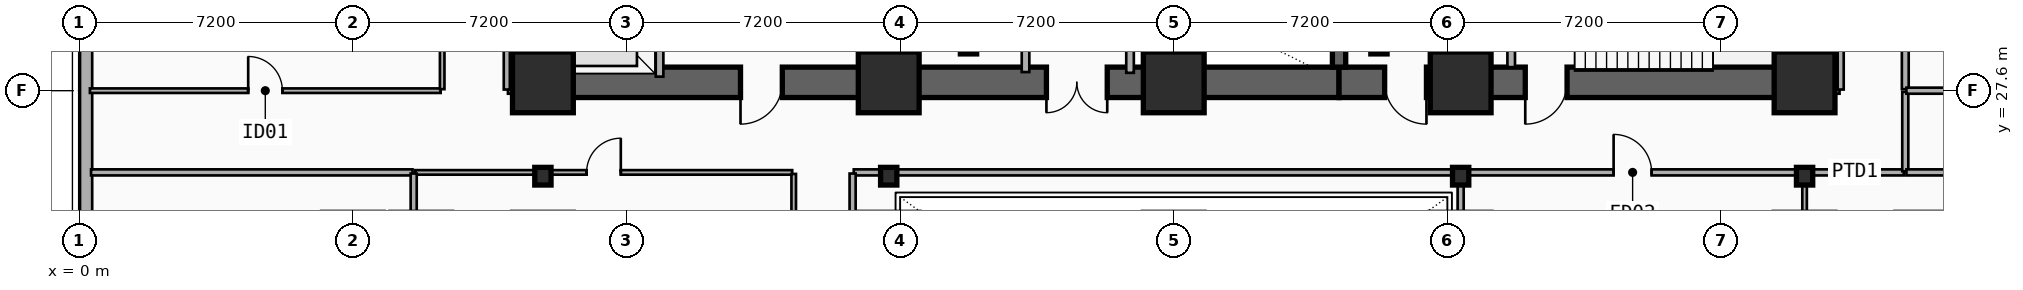
"""IFC4 building model, lengths in metres.
Left out: names, types, materials, properties, quantities, classifications, styles, units other than length and angle.
Written with IfcOpenShell. Run it as: python <this file> out.ifc"""

import sys

from ifc_helpers import new_model, si_unit, direction, frame, frame_2d, origin, origin_2d, place, context, subcontext, project, spatial, rectangle, i_section, extrude, element, fill, save


model = new_model("IFC4")
c1 = context("Model", 3, precision=1e-05, world=origin(), true_north=direction((0.0, 1.0)))
c2 = subcontext(c1, "Body", "Model", "MODEL_VIEW")
j1 = project(units=[si_unit("LENGTHUNIT", "METRE"), si_unit("PLANEANGLEUNIT", "RADIAN")], contexts=[c1])
p1 = place(None, origin())
s1 = spatial("IfcSite", under=j1, at=p1, CompositionType="ELEMENT")
p2 = place(p1, origin())
s2 = spatial("IfcBuilding", under=s1, at=p2, CompositionType="ELEMENT")
p3 = place(p2, frame((0.0, 0.0, 5.4)))
s3 = spatial("IfcBuildingStorey", under=s2, at=p3, CompositionType="ELEMENT", Elevation=5.4)
p4 = place(p3, frame((21.18, 27.82, 0.0), z_axis=(0.0, 0.0, 1.0), x_axis=(-1.0, 0.0, 0.0)))
e1 = element("IfcWall", 1, at=p4, inside=s3, PredefinedType="SHEAR", context=c2, shape_type="SweptSolid", body=[
    extrude(rectangle(XDim=9.03, YDim=0.8, at=frame_2d((4.515, 0.0))), origin(), (0.0, 0.0, 1.0), 5.0),
])
p5 = place(p4, frame((2.68, 0.0, 0.0)))
e2 = element("IfcOpeningElement", 2, at=p5, cuts=e1, PredefinedType="OPENING", context=c2, shape_type="SweptSolid", body=[
    extrude(rectangle(XDim=1.1, YDim=2.15, at=frame_2d((0.55, 1.075))), frame((0.0, 0.41, 0.0), z_axis=(0.0, -1.0, 0.0), x_axis=(1.0, 0.0, 0.0)), (0.0, 0.0, 1.0), 0.82),
])
p6 = place(p3, frame((33.15, 27.82, 0.0), z_axis=(0.0, 0.0, 1.0), x_axis=(-1.0, 0.0, 0.0)))
e3 = element("IfcWall", 3, at=p6, inside=s3, PredefinedType="SHEAR", context=c2, shape_type="SweptSolid", body=[
    extrude(rectangle(XDim=11.97, YDim=0.8, at=frame_2d((5.985, 0.0))), origin(), (0.0, 0.0, 1.0), 5.0),
])
p7 = place(p6, frame((6.1, 0.0, 0.0)))
e4 = element("IfcOpeningElement", 4, at=p7, cuts=e3, PredefinedType="OPENING", context=c2, shape_type="SweptSolid", body=[
    extrude(rectangle(XDim=1.6, YDim=2.2, at=frame_2d((0.8, 1.1))), frame((0.0, 0.41, 0.0), z_axis=(0.0, -1.0, 0.0), x_axis=(1.0, 0.0, 0.0)), (0.0, 0.0, 1.0), 0.82),
])
p8 = place(p3, frame((45.38, 27.82, 0.0), z_axis=(0.0, 0.0, 1.0), x_axis=(-1.0, 0.0, 0.0)))
e5 = element("IfcWall", 5, at=p8, inside=s3, PredefinedType="SHEAR", context=c2, shape_type="SweptSolid", body=[
    extrude(rectangle(XDim=12.23, YDim=0.8, at=frame_2d((6.115, 0.0))), origin(), (0.0, 0.0, 1.0), 5.0),
])
p9 = place(p8, frame((9.93, 0.0, 0.0)))
e6 = element("IfcOpeningElement", 6, at=p9, cuts=e5, PredefinedType="OPENING", context=c2, shape_type="SweptSolid", body=[
    extrude(rectangle(XDim=1.1, YDim=2.15, at=frame_2d((0.55, 1.075))), frame((0.0, 0.41, 0.0), z_axis=(0.0, -1.0, 0.0), x_axis=(1.0, 0.0, 0.0)), (0.0, 0.0, 1.0), 0.82),
])
p10 = place(p8, frame((6.23, 0.0, 0.0)))
e7 = element("IfcOpeningElement", 7, at=p10, cuts=e5, PredefinedType="OPENING", context=c2, shape_type="SweptSolid", body=[
    extrude(rectangle(XDim=1.1, YDim=2.15, at=frame_2d((0.55, 1.075))), frame((0.0, 0.41, 0.0), z_axis=(0.0, -1.0, 0.0), x_axis=(1.0, 0.0, 0.0)), (0.0, 0.0, 1.0), 0.82),
])
for number, where, z_axis, x_axis in (
    (8, (12.15, 28.22, 0.0), (0.0, 0.0, 1.0), (0.0, 1.0, 0.0)),
    (9, (45.38, 28.22, 0.0), (0.0, 0.0, 1.0), (0.0, 1.0, 0.0)),
):
    element("IfcWall", number, at=place(p3, frame(where, z_axis=z_axis, x_axis=x_axis)), inside=s3, PredefinedType="SHEAR", context=c2, shape_type="SweptSolid", body=[
        extrude(rectangle(XDim=8.43, YDim=0.8, at=frame_2d((4.215, 0.0))), origin(), (0.0, 0.0, 1.0), 5.0),
    ])
for number, where, z_axis, x_axis in (
    (10, (21.18, 28.22, 0.0), (0.0, 0.0, 1.0), (0.0, 1.0, 0.0)),
    (11, (33.15, 28.22, 0.0), (0.0, 0.0, 1.0), (0.0, 1.0, 0.0)),
):
    element("IfcWall", number, at=place(p3, frame(where, z_axis=z_axis, x_axis=x_axis)), inside=s3, PredefinedType="SHEAR", context=c2, shape_type="SweptSolid", body=[
        extrude(rectangle(XDim=8.43, YDim=0.35, at=frame_2d((4.215, 0.0))), origin(), (0.0, 0.0, 1.0), 5.0),
    ])
p11 = place(p3, frame((36.38, 28.22, 0.0), z_axis=(0.0, 0.0, 1.0), x_axis=(0.0, 1.0, 0.0)))
e12 = element("IfcWall", 12, at=p11, inside=s3, PredefinedType="SHEAR", context=c2, shape_type="SweptSolid", body=[
    extrude(rectangle(XDim=8.43, YDim=0.35, at=frame_2d((4.215, 0.0))), origin(), (0.0, 0.0, 1.0), 5.0),
])
p12 = place(p11, frame((3.56, 0.0, 0.0)))
e13 = element("IfcOpeningElement", 13, at=p12, cuts=e12, PredefinedType="OPENING", context=c2, shape_type="SweptSolid", body=[
    extrude(rectangle(XDim=1.1, YDim=2.15, at=frame_2d((0.55, 1.075))), frame((0.0, 0.185, 0.0), z_axis=(0.0, -1.0, 0.0), x_axis=(1.0, 0.0, 0.0)), (0.0, 0.0, 1.0), 0.37),
])
for number, where, z_axis, x_axis in (
    (14, (23.4, 28.8, 0.0), (0.0, 0.0, 1.0), (1.0, 0.0, 0.0)),
    (15, (34.2, 28.8, 0.0), (0.0, 0.0, 1.0), (1.0, 0.0, 0.0)),
):
    element("IfcColumn", number, at=place(p3, frame(where, z_axis=z_axis, x_axis=x_axis)), inside=s3, PredefinedType="COLUMN", context=c2, shape_type="SweptSolid", body=[
        extrude(i_section(OverallWidth=0.428, OverallDepth=0.465, WebThickness=0.045, FlangeThickness=0.073, FilletRadius=0.015, at=origin_2d()), origin(), (0.0, 0.0, 1.0), 5.0),
    ])
for number, where, z_axis, x_axis in (
    (16, (12.2, 27.82, 0.0), (0.0, 0.0, 1.0), (1.0, 0.0, 0.0)),
    (17, (21.3, 27.82, 0.0), (0.0, 0.0, 1.0), (1.0, 0.0, 0.0)),
    (18, (28.8, 27.82, 0.0), (0.0, 0.0, 1.0), (1.0, 0.0, 0.0)),
    (19, (36.35, 27.82, 0.0), (0.0, 0.0, 1.0), (1.0, 0.0, 0.0)),
    (20, (45.4, 27.82, 0.0), (0.0, 0.0, 1.0), (1.0, 0.0, 0.0)),
):
    element("IfcColumn", number, at=place(p3, frame(where, z_axis=z_axis, x_axis=x_axis)), inside=s3, PredefinedType="COLUMN", context=c2, shape_type="SweptSolid", body=[
        extrude(rectangle(XDim=1.6, YDim=1.6, at=origin_2d()), origin(), (0.0, 0.0, 1.0), 5.0),
    ])
for number, where, z_axis, x_axis in (
    (21, (12.2, 25.35, 0.0), (0.0, 0.0, 1.0), (1.0, 0.0, 0.0)),
    (22, (21.3, 25.35, 0.0), (0.0, 0.0, 1.0), (1.0, 0.0, 0.0)),
    (23, (36.35, 25.35, 0.0), (0.0, 0.0, 1.0), (1.0, 0.0, 0.0)),
    (24, (45.4, 25.35, 0.0), (0.0, 0.0, 1.0), (1.0, 0.0, 0.0)),
):
    element("IfcColumn", number, at=place(p3, frame(where, z_axis=z_axis, x_axis=x_axis)), inside=s3, PredefinedType="COLUMN", context=c2, shape_type="SweptSolid", body=[
        extrude(i_section(OverallWidth=0.428, OverallDepth=0.465, WebThickness=0.045, FlangeThickness=0.073, FilletRadius=0.015, at=origin_2d()), origin(), (0.0, 0.0, 1.0), 5.0),
    ])
p13 = place(p3, frame((0.18, 7.2, 0.0), z_axis=(0.0, 0.0, 1.0), x_axis=(0.0, 1.0, 0.0)))
e25 = element("IfcWall", 25, at=p13, inside=s3, PredefinedType="SOLIDWALL", context=c2, shape_type="SweptSolid", body=[
    extrude(rectangle(XDim=34.4, YDim=0.32, at=frame_2d((17.2, 0.0))), origin(), (0.0, 0.0, 1.0), 4.7),
])
p14 = place(p13, frame((22.35, 0.0, 0.9)))
e26 = element("IfcOpeningElement", 26, at=p14, cuts=e25, PredefinedType="OPENING", context=c2, shape_type="SweptSolid", body=[
    extrude(rectangle(XDim=2.4, YDim=1.8, at=frame_2d((1.2, 0.9))), frame((0.0, 0.17, 0.0), z_axis=(0.0, -1.0, 0.0), x_axis=(1.0, 0.0, 0.0)), (0.0, 0.0, 1.0), 0.34),
])
p15 = place(p13, frame((26.4, 0.0, 0.9)))
e27 = element("IfcOpeningElement", 27, at=p15, cuts=e25, PredefinedType="OPENING", context=c2, shape_type="SweptSolid", body=[
    extrude(rectangle(XDim=2.4, YDim=1.8, at=frame_2d((1.2, 0.9))), frame((0.0, 0.17, 0.0), z_axis=(0.0, -1.0, 0.0), x_axis=(1.0, 0.0, 0.0)), (0.0, 0.0, 1.0), 0.34),
])
p16 = place(p3, frame((15.27, 27.97, 0.0), z_axis=(0.0, 0.0, 1.0), x_axis=(0.0, 1.0, 0.0)))
e28 = element("IfcWall", 28, at=p16, inside=s3, PredefinedType="PARTITIONING", context=c2, shape_type="SweptSolid", body=[
    extrude(rectangle(XDim=2.96, YDim=0.2, at=frame_2d((1.48, 0.0))), origin(), (0.0, 0.0, 1.0), 3.672),
])
p17 = place(p16, frame((0.93, 0.0, 0.0)))
e29 = element("IfcOpeningElement", 29, at=p17, cuts=e28, PredefinedType="OPENING", context=c2, shape_type="SweptSolid", body=[
    extrude(rectangle(XDim=1.1, YDim=2.15, at=frame_2d((0.55, 1.075))), frame((0.0, 0.11, 0.0), z_axis=(0.0, -1.0, 0.0), x_axis=(1.0, 0.0, 0.0)), (0.0, 0.0, 1.0), 0.22),
])
p18 = place(p3, frame((27.65, 28.07, 0.0), z_axis=(0.0, 0.0, 1.0), x_axis=(0.0, 1.0, 0.0)))
e30 = element("IfcWall", 30, at=p18, inside=s3, PredefinedType="PARTITIONING", context=c2, shape_type="SweptSolid", body=[
    extrude(rectangle(XDim=2.58, YDim=0.2, at=frame_2d((1.29, 0.0))), origin(), (0.0, 0.0, 1.0), 3.672),
])
p19 = place(p3, frame((37.68, 28.22, 0.0), z_axis=(0.0, 0.0, 1.0), x_axis=(0.0, 1.0, 0.0)))
e31 = element("IfcWall", 31, at=p19, inside=s3, PredefinedType="PARTITIONING", context=c2, shape_type="SweptSolid", body=[
    extrude(rectangle(XDim=3.03, YDim=0.2, at=frame_2d((1.515, 0.0))), origin(), (0.0, 0.0, 1.0), 4.7),
])
p20 = place(p3, frame((24.9, 28.09, 0.0), z_axis=(0.0, 0.0, 1.0), x_axis=(0.0, 1.0, 0.0)))
e32 = element("IfcWall", 32, at=p20, inside=s3, PredefinedType="PARTITIONING", context=c2, shape_type="SweptSolid", body=[
    extrude(rectangle(XDim=2.82, YDim=0.2, at=frame_2d((1.41, 0.0))), origin(), (0.0, 0.0, 1.0), 4.7),
])
p21 = place(p20, frame((1.201, 0.0, 0.0)))
e33 = element("IfcOpeningElement", 33, at=p21, cuts=e32, PredefinedType="OPENING", context=c2, shape_type="SweptSolid", body=[
    extrude(rectangle(XDim=1.2, YDim=2.15, at=frame_2d((0.6, 1.075))), frame((0.0, 0.11, 0.0), z_axis=(0.0, -1.0, 0.0), x_axis=(1.0, 0.0, 0.0)), (0.0, 0.0, 1.0), 0.22),
])
p22 = place(p3, frame((0.28, 27.6, 0.0), z_axis=(0.0, 0.0, 1.0), x_axis=(1.0, 0.0, 0.0)))
e34 = element("IfcWall", 34, at=p22, inside=s3, PredefinedType="PARTITIONING", context=c2, shape_type="SweptSolid", body=[
    extrude(rectangle(XDim=9.23, YDim=0.12, at=frame_2d((4.615, 0.0))), origin(), (0.0, 0.0, 1.0), 4.7),
])
p23 = place(p22, frame((4.165, 0.0, 0.0)))
e35 = element("IfcOpeningElement", 35, at=p23, cuts=e34, PredefinedType="OPENING", context=c2, shape_type="SweptSolid", body=[
    extrude(rectangle(XDim=0.9, YDim=2.1, at=frame_2d((0.45, 1.05))), frame((0.0, 0.07, 0.0), z_axis=(0.0, -1.0, 0.0), x_axis=(1.0, 0.0, 0.0)), (0.0, 0.0, 1.0), 0.14),
])
p24 = place(p3, frame((8.84, 25.45, 0.0), z_axis=(0.0, 0.0, 1.0), x_axis=(1.0, 0.0, 0.0)))
e36 = element("IfcWall", 36, at=p24, inside=s3, PredefinedType="PARTITIONING", context=c2, shape_type="SweptSolid", body=[
    extrude(rectangle(XDim=9.92, YDim=0.12, at=frame_2d((4.96, 0.0))), origin(), (0.0, 0.0, 1.0), 3.672),
])
p25 = place(p24, frame((4.51, 0.0, 0.0)))
e37 = element("IfcOpeningElement", 37, at=p25, cuts=e36, PredefinedType="OPENING", context=c2, shape_type="SweptSolid", body=[
    extrude(rectangle(XDim=0.9, YDim=2.1, at=frame_2d((0.45, 1.05))), frame((0.0, 0.07, 0.0), z_axis=(0.0, -1.0, 0.0), x_axis=(1.0, 0.0, 0.0)), (0.0, 0.0, 1.0), 0.14),
])
p26 = place(p3, frame((36.39, 25.45, 0.0), z_axis=(0.0, 0.0, 1.0), x_axis=(1.0, 0.0, 0.0)))
e38 = element("IfcWall", 38, at=p26, inside=s3, PredefinedType="PARTITIONING", context=c2, shape_type="SweptSolid", body=[
    extrude(rectangle(XDim=8.97, YDim=0.16, at=frame_2d((4.485, 0.0))), origin(), (0.0, 0.0, 1.0), 3.672),
])
p27 = place(p26, frame((3.985, 0.0, 0.0)))
e39 = element("IfcOpeningElement", 39, at=p27, cuts=e38, PredefinedType="OPENING", context=c2, shape_type="SweptSolid", body=[
    extrude(rectangle(XDim=1.0, YDim=2.15, at=frame_2d((0.5, 1.075))), frame((0.0, 0.09, 0.0), z_axis=(0.0, -1.0, 0.0), x_axis=(1.0, 0.0, 0.0)), (0.0, 0.0, 1.0), 0.18),
])
p28 = place(p3, frame((45.44, 25.45, 0.0), z_axis=(0.0, 0.0, 1.0), x_axis=(1.0, 0.0, 0.0)))
e40 = element("IfcWall", 40, at=p28, inside=s3, PredefinedType="PARTITIONING", context=c2, shape_type="SweptSolid", body=[
    extrude(rectangle(XDim=2.57, YDim=0.16, at=frame_2d((1.285, 0.0))), origin(), (0.0, 0.0, 1.0), 3.672),
])
p29 = place(p3, frame((9.55, 27.64, 0.0), z_axis=(0.0, 0.0, 1.0), x_axis=(0.0, 1.0, 0.0)))
e41 = element("IfcWall", 41, at=p29, inside=s3, PredefinedType="PARTITIONING", context=c2, shape_type="SweptSolid", body=[
    extrude(rectangle(XDim=10.27, YDim=0.12, at=frame_2d((5.135, 0.0))), origin(), (0.0, 0.0, 1.0), 4.7),
])
p30 = place(p29, frame((4.685, 0.0, 0.0)))
e42 = element("IfcOpeningElement", 42, at=p30, cuts=e41, PredefinedType="OPENING", context=c2, shape_type="SweptSolid", body=[
    extrude(rectangle(XDim=0.9, YDim=2.1, at=frame_2d((0.45, 1.05))), frame((0.0, 0.07, 0.0), z_axis=(0.0, -1.0, 0.0), x_axis=(1.0, 0.0, 0.0)), (0.0, 0.0, 1.0), 0.14),
])
p31 = place(p3, frame((48.05, 27.64, 0.0), z_axis=(0.0, 0.0, 1.0), x_axis=(0.0, 1.0, 0.0)))
e43 = element("IfcWall", 43, at=p31, inside=s3, PredefinedType="PLUMBINGWALL", context=c2, shape_type="SweptSolid", body=[
    extrude(rectangle(XDim=3.92, YDim=0.18, at=frame_2d((1.96, 0.0))), origin(), (0.0, 0.0, 1.0), 4.7),
])
p32 = place(p31, frame((1.535, 0.0, 0.0)))
e44 = element("IfcOpeningElement", 44, at=p32, cuts=e43, PredefinedType="OPENING", context=c2, shape_type="SweptSolid", body=[
    extrude(rectangle(XDim=0.85, YDim=2.1, at=frame_2d((0.425, 1.05))), frame((0.0, 0.1, 0.0), z_axis=(0.0, -1.0, 0.0), x_axis=(1.0, 0.0, 0.0)), (0.0, 0.0, 1.0), 0.2),
])
p33 = place(p3, frame((18.8, 12.04, 0.0), z_axis=(0.0, 0.0, 1.0), x_axis=(0.0, 1.0, 0.0)))
e45 = element("IfcWall", 45, at=p33, inside=s3, PredefinedType="PARTITIONING", context=c2, shape_type="SweptSolid", body=[
    extrude(rectangle(XDim=13.37, YDim=0.12, at=frame_2d((6.685, 0.0))), origin(), (0.0, 0.0, 1.0), 3.672),
])
p34 = place(p33, frame((6.235, 0.0, 0.0)))
e46 = element("IfcOpeningElement", 46, at=p34, cuts=e45, PredefinedType="OPENING", context=c2, shape_type="SweptSolid", body=[
    extrude(rectangle(XDim=0.9, YDim=2.1, at=frame_2d((0.45, 1.05))), frame((0.0, 0.07, 0.0), z_axis=(0.0, -1.0, 0.0), x_axis=(1.0, 0.0, 0.0)), (0.0, 0.0, 1.0), 0.14),
])
p35 = place(p3, frame((45.4, 14.24, 0.0), z_axis=(0.0, 0.0, 1.0), x_axis=(0.0, 1.0, 0.0)))
e47 = element("IfcWall", 47, at=p35, inside=s3, PredefinedType="PARTITIONING", context=c2, shape_type="SweptSolid", body=[
    extrude(rectangle(XDim=11.17, YDim=0.12, at=frame_2d((5.585, 0.0))), origin(), (0.0, 0.0, 1.0), 3.672),
])
p36 = place(p35, frame((5.135, 0.0, 0.0)))
e48 = element("IfcOpeningElement", 48, at=p36, cuts=e47, PredefinedType="OPENING", context=c2, shape_type="SweptSolid", body=[
    extrude(rectangle(XDim=0.9, YDim=2.1, at=frame_2d((0.45, 1.05))), frame((0.0, 0.07, 0.0), z_axis=(0.0, -1.0, 0.0), x_axis=(1.0, 0.0, 0.0)), (0.0, 0.0, 1.0), 0.14),
])
p37 = place(p3, frame((0.31, 25.45, 0.0), z_axis=(0.0, 0.0, 1.0), x_axis=(1.0, 0.0, 0.0)))
e49 = element("IfcWall", 49, at=p37, inside=s3, PredefinedType="PARTITIONING", context=c2, shape_type="SweptSolid", body=[
    extrude(rectangle(XDim=8.46, YDim=0.16, at=frame_2d((4.23, 0.0))), origin(), (0.0, 0.0, 1.0), 4.7),
])
p38 = place(p3, frame((20.38, 25.45, 0.0), z_axis=(0.0, 0.0, 1.0), x_axis=(1.0, 0.0, 0.0)))
e50 = element("IfcWall", 50, at=p38, inside=s3, PredefinedType="PARTITIONING", context=c2, shape_type="SweptSolid", body=[
    extrude(rectangle(XDim=15.94, YDim=0.16, at=frame_2d((7.97, 0.0))), origin(), (0.0, 0.0, 1.0), 3.672),
])
p39 = place(p3, frame((11.28, 27.6, 0.0), z_axis=(0.0, 0.0, 1.0), x_axis=(1.0, 0.0, 0.0)))
e51 = element("IfcWall", 51, at=p39, inside=s3, PredefinedType="PARTITIONING", context=c2, shape_type="SweptSolid", body=[
    extrude(rectangle(XDim=0.84, YDim=0.16, at=frame_2d((0.42, 0.0))), origin(), (0.0, 0.0, 1.0), 3.672),
])
p40 = place(p3, frame((45.41, 27.6, 0.0), z_axis=(0.0, 0.0, 1.0), x_axis=(1.0, 0.0, 0.0)))
e52 = element("IfcWall", 52, at=p40, inside=s3, PredefinedType="PARTITIONING", context=c2, shape_type="SweptSolid", body=[
    extrude(rectangle(XDim=0.91, YDim=0.16, at=frame_2d((0.455, 0.0))), origin(), (0.0, 0.0, 1.0), 3.672),
])
p41 = place(p3, frame((48.05, 25.48, 0.0), z_axis=(0.0, 0.0, 1.0), x_axis=(0.0, 1.0, 0.0)))
e53 = element("IfcWall", 53, at=p41, inside=s3, PredefinedType="PARTITIONING", context=c2, shape_type="SweptSolid", body=[
    extrude(rectangle(XDim=2.09, YDim=0.16, at=frame_2d((1.045, 0.0))), origin(), (0.0, 0.0, 1.0), 4.7),
])
for number, where, z_axis, x_axis in (
    (54, (11.25, 27.63, 0.0), (0.0, 0.0, 1.0), (0.0, 1.0, 0.0)),
    (55, (46.35, 27.63, 0.0), (0.0, 0.0, 1.0), (0.0, 1.0, 0.0)),
):
    element("IfcWall", number, at=place(p3, frame(where, z_axis=z_axis, x_axis=x_axis)), inside=s3, PredefinedType="PARTITIONING", context=c2, shape_type="SweptSolid", body=[
        extrude(rectangle(XDim=10.29, YDim=0.16, at=frame_2d((5.145, 0.0))), origin(), (0.0, 0.0, 1.0), 4.7),
    ])
p42 = place(p3, frame((48.08, 27.6, 0.0), z_axis=(0.0, 0.0, 1.0), x_axis=(1.0, 0.0, 0.0)))
e56 = element("IfcWall", 56, at=p42, inside=s3, PredefinedType="PARTITIONING", context=c2, shape_type="SweptSolid", body=[
    extrude(rectangle(XDim=4.69, YDim=0.16, at=frame_2d((2.345, 0.0))), origin(), (0.0, 0.0, 1.0), 4.7),
])
p43 = place(p3, frame((20.35, 14.23, 0.0), z_axis=(0.0, 0.0, 1.0), x_axis=(0.0, 1.0, 0.0)))
e57 = element("IfcWall", 57, at=p43, inside=s3, PredefinedType="PARTITIONING", context=c2, shape_type="SweptSolid", body=[
    extrude(rectangle(XDim=11.19, YDim=0.16, at=frame_2d((5.595, 0.0))), origin(), (0.0, 0.0, 1.0), 3.672),
])
p44 = place(p3, frame((8.8, 3.91, 0.0), z_axis=(0.0, 0.0, 1.0), x_axis=(0.0, 1.0, 0.0)))
e58 = element("IfcWall", 58, at=p44, inside=s3, PredefinedType="PARTITIONING", context=c2, shape_type="SweptSolid", body=[
    extrude(rectangle(XDim=21.51, YDim=0.16, at=frame_2d((10.755, 0.0))), origin(), (0.0, 0.0, 1.0), 4.03),
])
p45 = place(p3, frame((36.35, 14.23, 0.0), z_axis=(0.0, 0.0, 1.0), x_axis=(0.0, 1.0, 0.0)))
e59 = element("IfcWall", 59, at=p45, inside=s3, PredefinedType="PARTITIONING", context=c2, shape_type="SweptSolid", body=[
    extrude(rectangle(XDim=11.19, YDim=0.16, at=frame_2d((5.595, 0.0))), origin(), (0.0, 0.0, 1.0), 3.672),
])
p46 = place(p3, frame((48.08, 25.45, 0.0), z_axis=(0.0, 0.0, 1.0), x_axis=(1.0, 0.0, 0.0)))
e60 = element("IfcWall", 60, at=p46, inside=s3, PredefinedType="PARTITIONING", context=c2, shape_type="SweptSolid", body=[
    extrude(rectangle(XDim=9.21, YDim=0.16, at=frame_2d((4.605, 0.0))), origin(), (0.0, 0.0, 1.0), 4.7),
])
p47 = place(p5, origin())
e61 = element("IfcDoor", 61, at=p47, inside=s3, OperationType="SINGLE_SWING_RIGHT", PredefinedType="DOOR", context=c2, shape_type="SweptSolid", body=[
    extrude(rectangle(XDim=1.1, YDim=2.15, at=frame_2d((0.55, 1.075))), frame((0.0, 0.025, 0.0), z_axis=(0.0, -1.0, 0.0), x_axis=(1.0, 0.0, 0.0)), (0.0, 0.0, 1.0), 0.05),
])
fill(e2, e61)
p48 = place(p9, origin())
e62 = element("IfcDoor", 62, at=p48, inside=s3, OperationType="SINGLE_SWING_LEFT", PredefinedType="DOOR", context=c2, shape_type="SweptSolid", body=[
    extrude(rectangle(XDim=1.1, YDim=2.15, at=frame_2d((0.55, 1.075))), frame((0.0, 0.025, 0.0), z_axis=(0.0, -1.0, 0.0), x_axis=(1.0, 0.0, 0.0)), (0.0, 0.0, 1.0), 0.05),
])
fill(e6, e62)
p49 = place(p10, origin())
e63 = element("IfcDoor", 63, at=p49, inside=s3, OperationType="SINGLE_SWING_RIGHT", PredefinedType="DOOR", context=c2, shape_type="SweptSolid", body=[
    extrude(rectangle(XDim=1.1, YDim=2.15, at=frame_2d((0.55, 1.075))), frame((0.0, 0.025, 0.0), z_axis=(0.0, -1.0, 0.0), x_axis=(1.0, 0.0, 0.0)), (0.0, 0.0, 1.0), 0.05),
])
fill(e7, e63)
p50 = place(p7, origin())
e64 = element("IfcDoor", 64, at=p50, inside=s3, OperationType="SINGLE_SWING_LEFT", PredefinedType="DOOR", context=c2, shape_type="SweptSolid", body=[
    extrude(rectangle(XDim=1.6, YDim=2.2, at=frame_2d((0.8, 1.1))), frame((0.0, 0.025, 0.0), z_axis=(0.0, -1.0, 0.0), x_axis=(1.0, 0.0, 0.0)), (0.0, 0.0, 1.0), 0.05),
])
fill(e4, e64)
p51 = place(p23, origin())
e65 = element("IfcDoor", 65, at=p51, inside=s3, OperationType="SINGLE_SWING_LEFT", PredefinedType="DOOR", context=c2, shape_type="SweptSolid", body=[
    extrude(rectangle(XDim=0.9, YDim=2.1, at=frame_2d((0.45, 1.05))), frame((0.0, 0.025, 0.0), z_axis=(0.0, -1.0, 0.0), x_axis=(1.0, 0.0, 0.0)), (0.0, 0.0, 1.0), 0.05),
])
fill(e35, e65)
p52 = place(p25, origin())
e66 = element("IfcDoor", 66, at=p52, inside=s3, OperationType="SINGLE_SWING_RIGHT", PredefinedType="DOOR", context=c2, shape_type="SweptSolid", body=[
    extrude(rectangle(XDim=0.9, YDim=2.1, at=frame_2d((0.45, 1.05))), frame((0.0, 0.025, 0.0), z_axis=(0.0, -1.0, 0.0), x_axis=(1.0, 0.0, 0.0)), (0.0, 0.0, 1.0), 0.05),
])
fill(e37, e66)
p53 = place(p27, origin())
e67 = element("IfcDoor", 67, at=p53, inside=s3, OperationType="SINGLE_SWING_LEFT", PredefinedType="DOOR", context=c2, shape_type="SweptSolid", body=[
    extrude(rectangle(XDim=1.0, YDim=2.15, at=frame_2d((0.5, 1.075))), frame((0.0, 0.025, 0.0), z_axis=(0.0, -1.0, 0.0), x_axis=(1.0, 0.0, 0.0)), (0.0, 0.0, 1.0), 0.05),
])
fill(e39, e67)
save(model, sys.argv[1])
